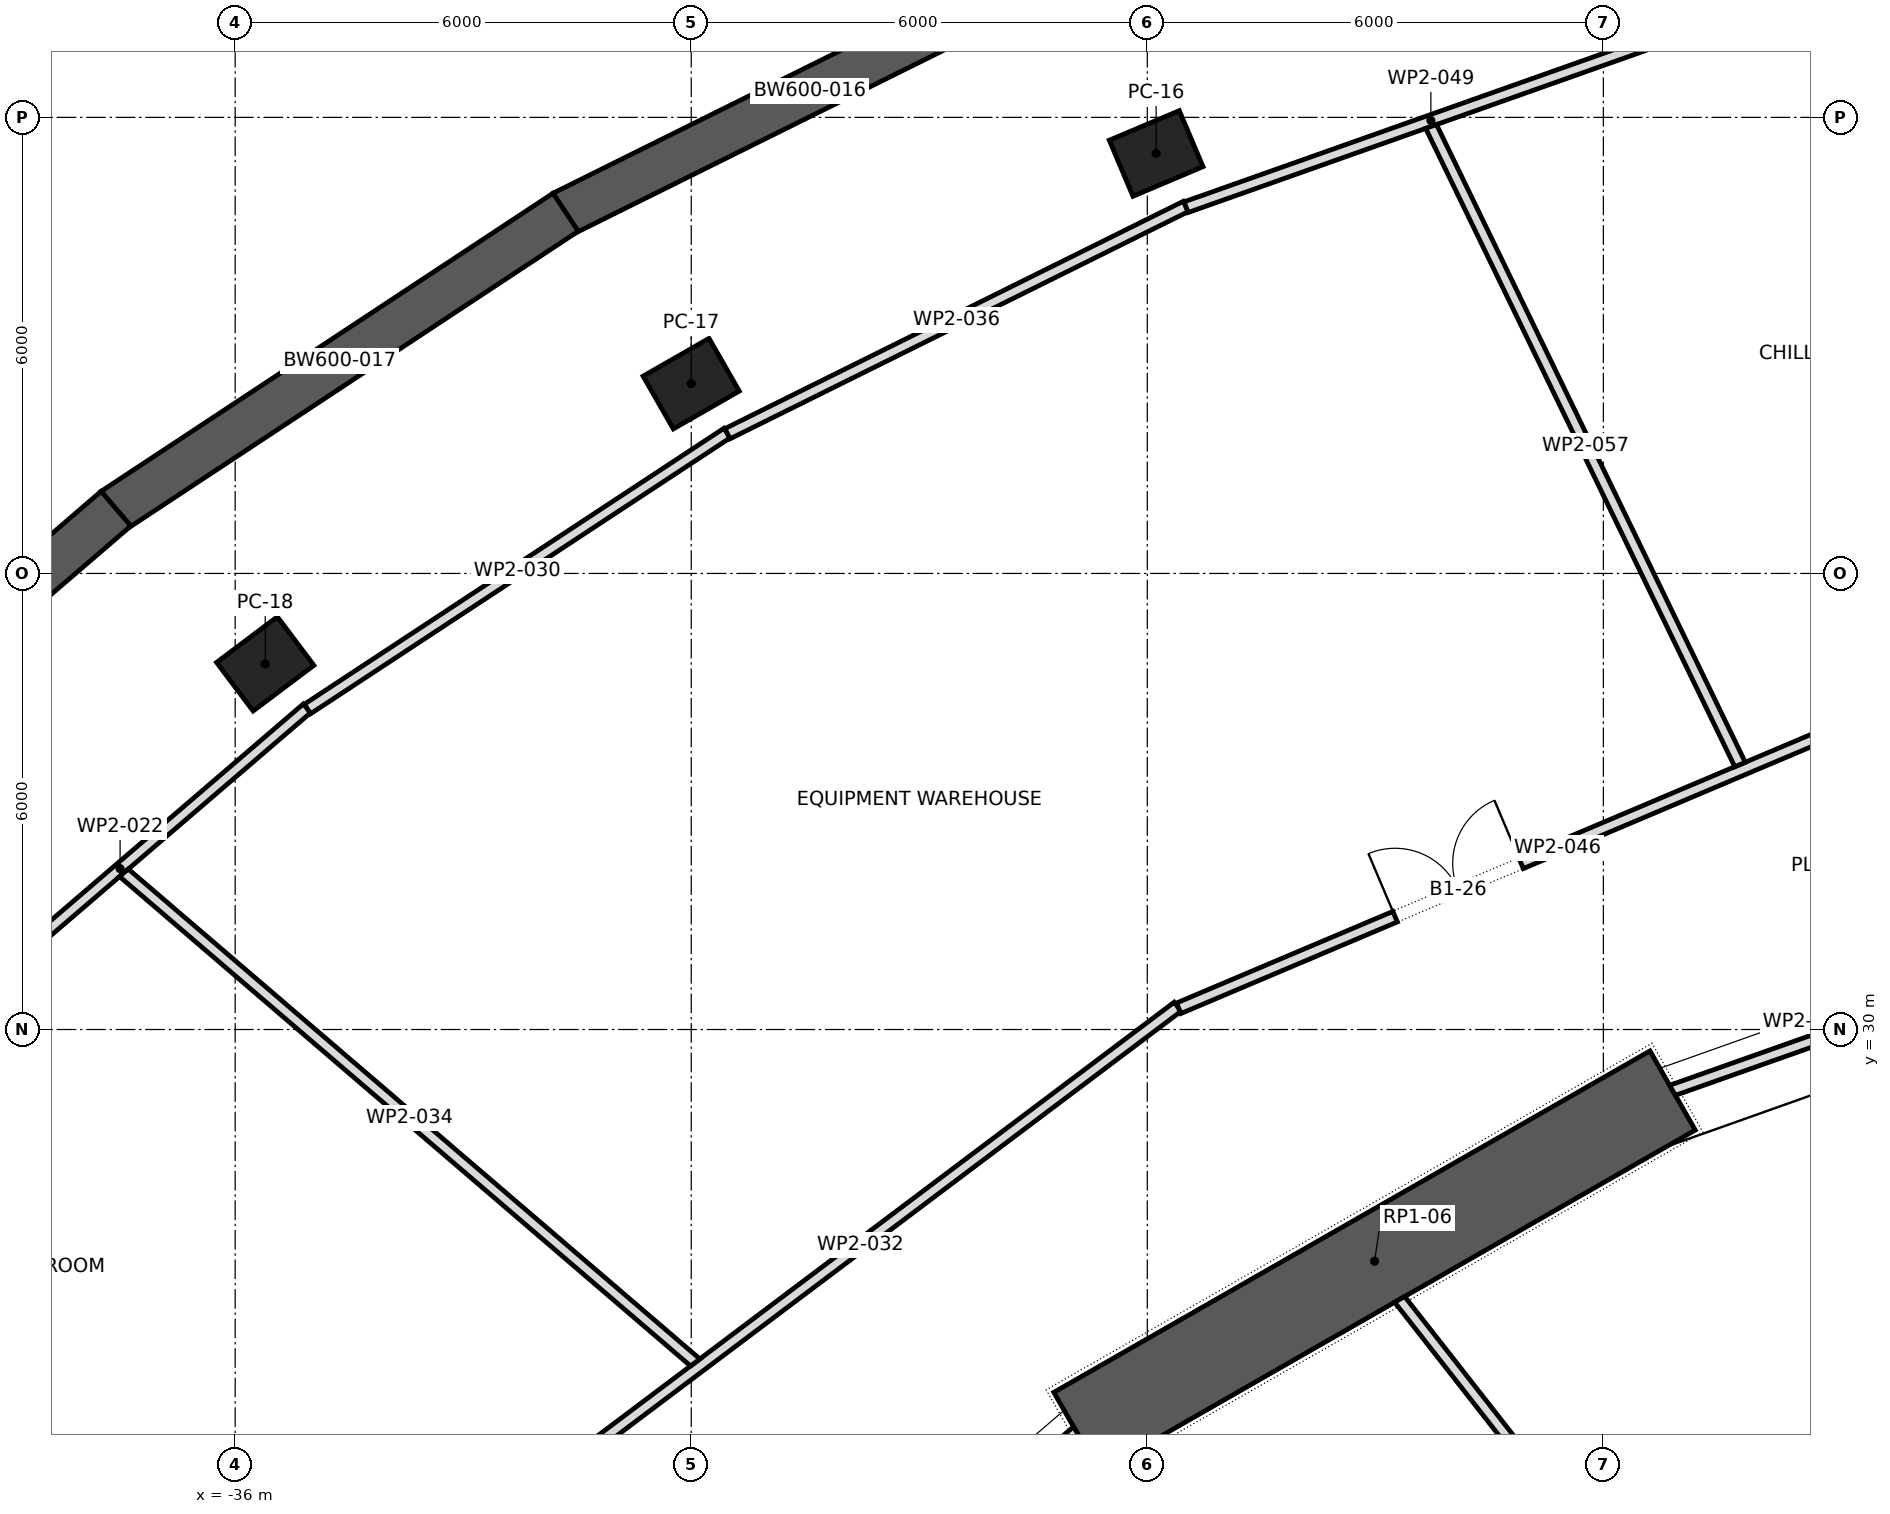
"""IFC4 building model, lengths in metres.
Left out: names, types, materials, properties, quantities, classifications, styles, units other than length and angle.
Written with IfcOpenShell. Run it as: python <this file> out.ifc"""

import sys

from ifc_helpers import new_model, si_unit, direction, frame, frame_2d, origin, origin_2d, place, context, subcontext, project, spatial, polyline, rectangle, outline, extrude, element, fill, save


model = new_model("IFC4")
c1 = context("Model", 3, precision=1e-05, world=origin(), true_north=direction((0.0, 1.0)))
c2 = subcontext(c1, "Body", "Model", "MODEL_VIEW")
j1 = project(units=[si_unit("LENGTHUNIT", "METRE"), si_unit("PLANEANGLEUNIT", "RADIAN")], contexts=[c1])
p1 = place(None, origin())
s1 = spatial("IfcSite", under=j1, at=p1, CompositionType="ELEMENT")
p2 = place(p1, origin())
s2 = spatial("IfcBuilding", under=s1, at=p2, CompositionType="ELEMENT")
p3 = place(p2, frame((0.0, 0.0, -4.0)))
s3 = spatial("IfcBuildingStorey", under=s2, at=p3, CompositionType="ELEMENT", Elevation=-4.0)
for number, where, z_axis, x_axis in (
    (1, (-23.884, 41.525, 0.0), (0.0, 0.0, 1.0), (-0.921, -0.389, 0.0)),
    (2, (-30.001, 38.497, 0.0), (0.0, 0.0, 1.0), (-0.868, -0.497, 0.0)),
    (3, (-35.605, 34.81, 0.0), (0.0, 0.0, 1.0), (-0.799, -0.601, 0.0)),
):
    element("IfcColumn", number, at=place(p3, frame(where, z_axis=z_axis, x_axis=x_axis)), inside=s3, PredefinedType="COLUMN", context=c2, shape_type="SweptSolid", body=[
        extrude(rectangle(XDim=1.0, YDim=0.8, at=origin_2d()), origin(), (0.0, 0.0, 1.0), 4.0),
    ])
p4 = place(p3, frame((-17.089, 29.198, 0.0), z_axis=(0.0, 0.0, 1.0), x_axis=(-0.867760656864, -0.496982336103, 0.0)))
e4 = element("IfcWall", 4, at=p4, inside=s3, PredefinedType="SHEAR", context=c2, shape_type="SweptSolid", body=[
    extrude(rectangle(XDim=9.038, YDim=1.2, at=frame_2d((4.519, 0.0))), origin(), (0.0, 0.0, 1.0), 4.0),
])
p5 = place(p3, frame((-25.195, 43.955, 0.0), z_axis=(0.0, 0.0, 1.0), x_axis=(-0.895750986496, -0.44455614965, 0.0)))
e5 = element("IfcWall", 5, at=p5, inside=s3, PredefinedType="SOLIDWALL", context=c2, shape_type="SweptSolid", body=[
    extrude(rectangle(XDim=7.245, YDim=0.6, at=frame_2d((3.623, 0.0))), origin(), (0.0, 0.0, 1.0), 4.0),
])
p6 = place(p3, frame((-31.652, 40.752, 0.0), z_axis=(0.0, 0.0, 1.0), x_axis=(-0.834745196239, -0.550636411215, 0.0)))
e6 = element("IfcWall", 6, at=p6, inside=s3, PredefinedType="SOLIDWALL", context=c2, shape_type="SweptSolid", body=[
    extrude(rectangle(XDim=7.124, YDim=0.6, at=frame_2d((3.562, 0.0))), origin(), (0.0, 0.0, 1.0), 4.0),
])
p7 = place(p3, frame((-37.568, 36.853, 0.0), z_axis=(0.0, 0.0, 1.0), x_axis=(-0.758319142722, -0.65188348482, 0.0)))
e7 = element("IfcWall", 7, at=p7, inside=s3, PredefinedType="SOLIDWALL", context=c2, shape_type="SweptSolid", body=[
    extrude(rectangle(XDim=6.991, YDim=0.6, at=frame_2d((3.496, 0.0))), origin(), (0.0, 0.0, 1.0), 4.0),
])
p8 = place(p3, frame((-39.973, 30.007, 0.0), z_axis=(0.0, 0.0, 1.0), x_axis=(0.759038455419, 0.651045791934, 0.0)))
e8 = element("IfcWall", 8, at=p8, inside=s3, PredefinedType="PARTITIONING", context=c2, shape_type="SweptSolid", body=[
    extrude(rectangle(XDim=6.479, YDim=0.15, at=frame_2d((3.24, 0.0))), origin(), (0.0, 0.0, 1.0), 3.55),
])
p9 = place(p3, frame((-35.049, 34.217, 0.0), z_axis=(0.0, 0.0, 1.0), x_axis=(0.83553583791, 0.549435950378, 0.0)))
e9 = element("IfcWall", 9, at=p9, inside=s3, PredefinedType="PARTITIONING", context=c2, shape_type="SweptSolid", body=[
    extrude(rectangle(XDim=6.606, YDim=0.15, at=frame_2d((3.303, 0.0))), origin(), (0.0, 0.0, 1.0), 3.55),
])
p10 = place(p3, frame((-31.947, 24.022, 0.0), z_axis=(0.0, 0.0, 1.0), x_axis=(0.799194171191, 0.601072937949, 0.0)))
e10 = element("IfcWall", 10, at=p10, inside=s3, PredefinedType="PARTITIONING", context=c2, shape_type="SweptSolid", body=[
    extrude(rectangle(XDim=10.444, YDim=0.15, at=frame_2d((5.222, 0.0))), origin(), (0.0, 0.0, 1.0), 3.55),
])
p11 = place(p3, frame((-29.947, 25.619, 0.0), z_axis=(0.0, 0.0, 1.0), x_axis=(-0.759265306208, 0.650781218836, 0.0)))
e11 = element("IfcWall", 11, at=p11, inside=s3, PredefinedType="PARTITIONING", context=c2, shape_type="SweptSolid", body=[
    extrude(outline(polyline([(-0.017, -0.075), (9.888, -0.075), (9.911, 0.075), (0.017, 0.075), (-0.017, -0.075)])), origin(), (0.0, 0.0, 1.0), 3.55),
])
p12 = place(p3, frame((-29.523, 37.838, 0.0), z_axis=(0.0, 0.0, 1.0), x_axis=(0.895909442692, 0.444236727991, 0.0)))
e12 = element("IfcWall", 12, at=p12, inside=s3, PredefinedType="PARTITIONING", context=c2, shape_type="SweptSolid", body=[
    extrude(rectangle(XDim=6.731, YDim=0.15, at=frame_2d((3.365, 0.0))), origin(), (0.0, 0.0, 1.0), 3.55),
])
p13 = place(p3, frame((-24.932, 24.708, 0.0), z_axis=(0.0, 0.0, 1.0), x_axis=(-0.760084552743, -0.649824185978, 0.0)))
e13 = element("IfcWall", 13, at=p13, inside=s3, PredefinedType="PARTITIONING", context=c2, shape_type="SweptSolid", body=[
    extrude(outline(polyline([(-0.014, -0.075), (5.09, -0.075), (5.06, 0.075), (0.014, 0.075), (-0.014, -0.075)])), origin(), (0.0, 0.0, 1.0), 3.1),
])
p14 = place(p3, frame((-23.586, 30.28, 0.0), z_axis=(0.0, 0.0, 1.0), x_axis=(0.920903415875, 0.389790839591, 0.0)))
e14 = element("IfcWall", 14, at=p14, inside=s3, PredefinedType="PARTITIONING", context=c2, shape_type="SweptSolid", body=[
    extrude(rectangle(XDim=10.823, YDim=0.15, at=frame_2d((5.412, 0.0))), origin(), (0.0, 0.0, 1.0), 3.55),
])
p15 = place(p14, frame((3.091, 0.0, 0.0)))
e15 = element("IfcOpeningElement", 15, at=p15, cuts=e14, PredefinedType="OPENING", context=c2, shape_type="SweptSolid", body=[
    extrude(rectangle(XDim=1.8, YDim=2.1, at=frame_2d((0.9, 1.05))), frame((0.0, 0.087, 0.0), z_axis=(0.0, -1.0, 0.0), x_axis=(1.0, 0.0, 0.0)), (0.0, 0.0, 1.0), 0.174),
])
p16 = place(p3, frame((-23.49, 40.819, 0.0), z_axis=(0.0, 0.0, 1.0), x_axis=(0.942678523295, 0.333702265079, 0.0)))
e16 = element("IfcWall", 16, at=p16, inside=s3, PredefinedType="PARTITIONING", context=c2, shape_type="SweptSolid", body=[
    extrude(rectangle(XDim=6.832, YDim=0.15, at=frame_2d((3.416, 0.0))), origin(), (0.0, 0.0, 1.0), 3.55),
])
p17 = place(p3, frame((-20.68, 26.45, 0.0), z_axis=(0.0, 0.0, 1.0), x_axis=(0.616465586388, -0.787381851962, 0.0)))
e17 = element("IfcWall", 17, at=p17, inside=s3, PredefinedType="PARTITIONING", context=c2, shape_type="SweptSolid", body=[
    extrude(outline(polyline([(-0.011, -0.075), (14.1, -0.075), (14.1, 0.075), (0.011, 0.075), (-0.011, -0.075)])), origin(), (0.0, 0.0, 1.0), 3.55),
])
p18 = place(p3, frame((-16.202, 33.486, 0.0), z_axis=(0.0, 0.0, 1.0), x_axis=(-0.435764801027, 0.900060574731, 0.0)))
e18 = element("IfcWall", 18, at=p18, inside=s3, PredefinedType="PARTITIONING", context=c2, shape_type="SweptSolid", body=[
    extrude(outline(polyline([(-0.004, -0.075), (9.319, -0.075), (9.335, 0.075), (0.004, 0.075), (-0.004, -0.075)])), origin(), (0.0, 0.0, 1.0), 3.55),
])
p19 = place(p3, frame((-11.967, 31.011, 0.0), z_axis=(0.0, 0.0, 1.0), x_axis=(-0.942814385805, -0.333318217204, 0.0)))
e19 = element("IfcWall", 19, at=p19, inside=s3, PredefinedType="PARTITIONING", context=c2, shape_type="SweptSolid", body=[
    extrude(outline(polyline([(-0.013, -0.075), (5.448, -0.075), (5.421, 0.075), (0.013, 0.075), (-0.013, -0.075)])), origin(), (0.0, 0.0, 1.0), 3.1),
])
p20 = place(p15, origin())
e20 = element("IfcDoor", 20, at=p20, inside=s3, OperationType="DOUBLE_DOOR_SINGLE_SWING", PredefinedType="DOOR", context=c2, shape_type="SweptSolid", body=[
    extrude(rectangle(XDim=1.8, YDim=2.1, at=frame_2d((0.9, 1.05))), frame((0.0, 0.025, 0.0), z_axis=(0.0, -1.0, 0.0), x_axis=(1.0, 0.0, 0.0)), (0.0, 0.0, 1.0), 0.05),
])
fill(e15, e20)
save(model, sys.argv[1])
